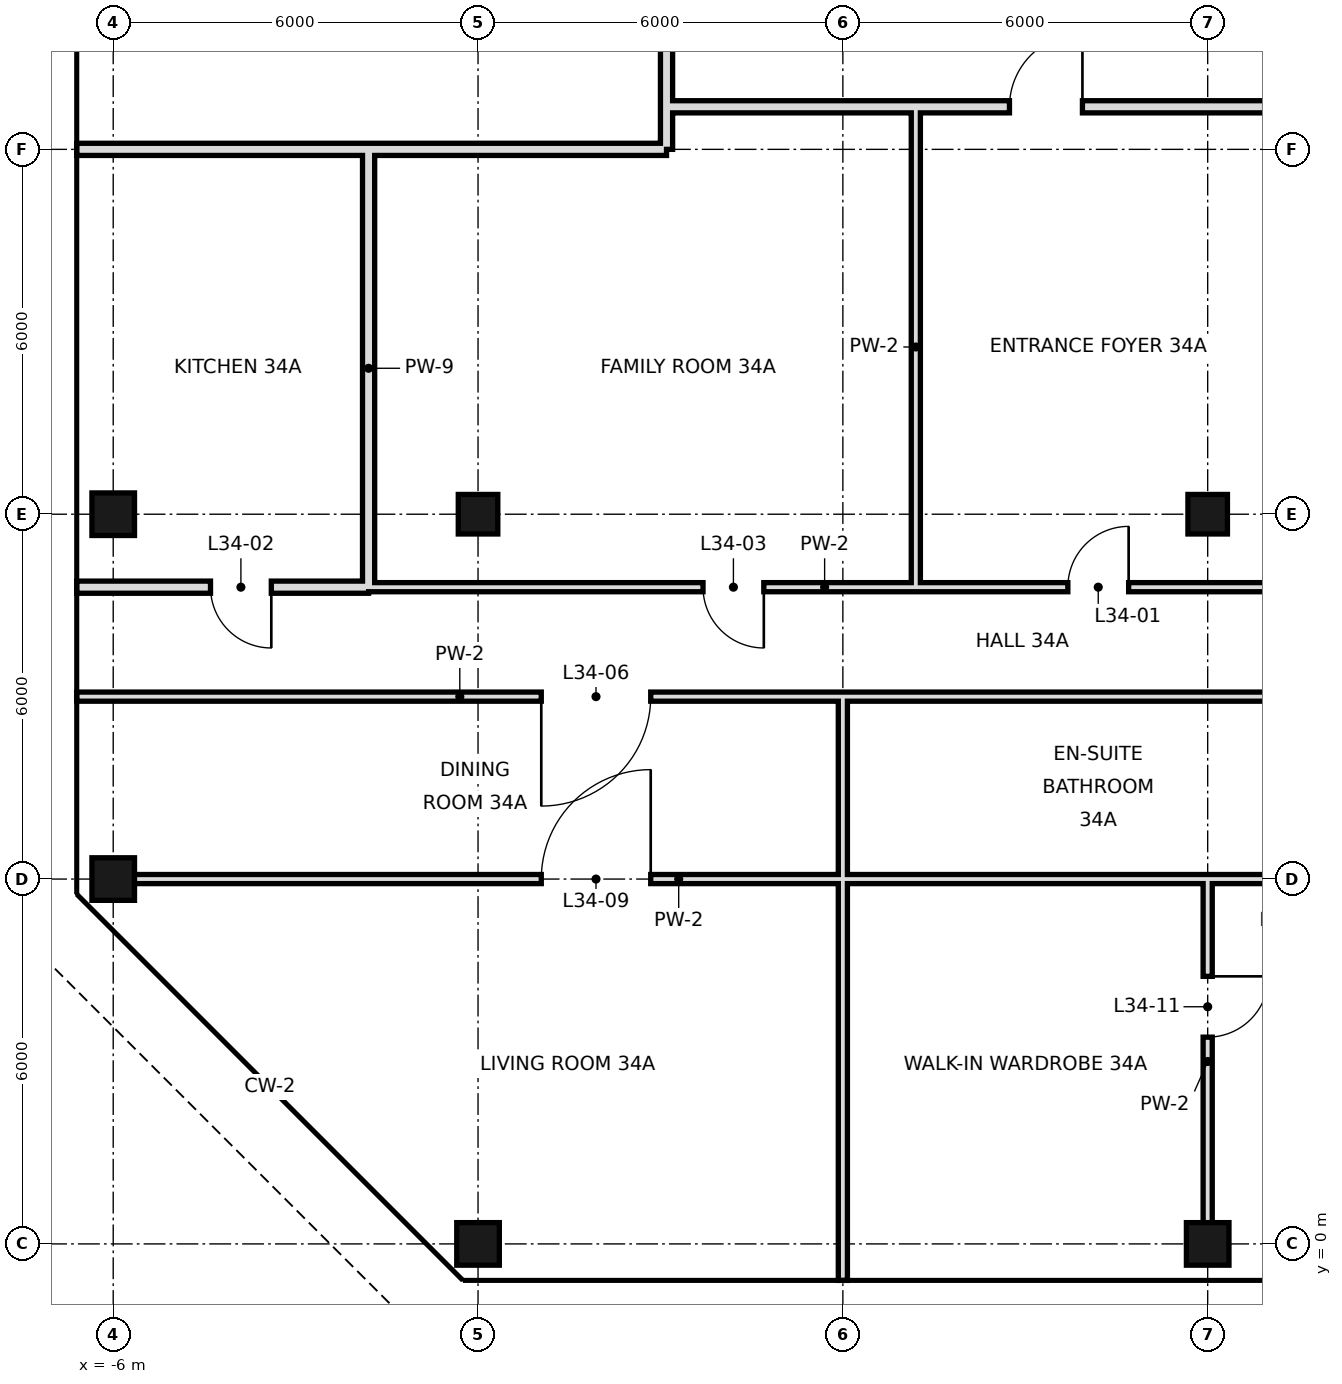
"""IFC4 building model, lengths in metres.
Left out: names, types, materials, properties, quantities, classifications, styles, units other than length and angle.
Written with IfcOpenShell. Run it as: python <this file> out.ifc"""

import sys

from ifc_helpers import new_model, si_unit, direction, frame, frame_2d, origin, origin_2d, place, context, subcontext, project, spatial, rectangle, hollow_rectangle, extrude, element, fill, save


model = new_model("IFC4")
c1 = context("Model", 3, precision=1e-05, world=origin(), true_north=direction((0.0, 1.0)))
c2 = subcontext(c1, "Body", "Model", "MODEL_VIEW")
j1 = project(units=[si_unit("LENGTHUNIT", "METRE"), si_unit("PLANEANGLEUNIT", "RADIAN")], contexts=[c1])
p1 = place(None, origin())
s1 = spatial("IfcSite", under=j1, at=p1, CompositionType="ELEMENT")
p2 = place(p1, origin())
s2 = spatial("IfcBuilding", under=s1, at=p2, CompositionType="ELEMENT")
p3 = place(p2, frame((0.0, 0.0, 151.0)))
s3 = spatial("IfcBuildingStorey", under=s2, at=p3, CompositionType="ELEMENT", Elevation=151.0)
for number, where, z_axis, x_axis in (
    (1, (-6.0, 6.0, 0.0), (0.0, 0.0, 1.0), (1.0, 0.0, 0.0)),
    (2, (-6.0, 12.0, 0.0), (0.0, 0.0, 1.0), (1.0, 0.0, 0.0)),
    (3, (0.0, 0.0, 0.0), (0.0, 0.0, 1.0), (1.0, 0.0, 0.0)),
):
    element("IfcColumn", number, at=place(p3, frame(where, z_axis=z_axis, x_axis=x_axis)), inside=s3, PredefinedType="COLUMN", context=c2, shape_type="SweptSolid", body=[
        extrude(hollow_rectangle(XDim=0.7, YDim=0.7, WallThickness=0.036, at=origin_2d()), origin(), (0.0, 0.0, 1.0), 3.6),
    ])
p4 = place(p3, frame((0.0, 12.0, 0.0), z_axis=(0.0, 0.0, 1.0), x_axis=(1.0, 0.0, 0.0)))
e4 = element("IfcColumn", 4, at=p4, inside=s3, PredefinedType="COLUMN", context=c2, shape_type="SweptSolid", body=[
    extrude(hollow_rectangle(XDim=0.65, YDim=0.65, WallThickness=0.032, at=origin_2d()), origin(), (0.0, 0.0, 1.0), 3.6),
])
p5 = place(p3, frame((12.0, 0.0, 0.0), z_axis=(0.0, 0.0, 1.0), x_axis=(1.0, 0.0, 0.0)))
e5 = element("IfcColumn", 5, at=p5, inside=s3, PredefinedType="COLUMN", context=c2, shape_type="SweptSolid", body=[
    extrude(hollow_rectangle(XDim=0.7, YDim=0.7, WallThickness=0.036, at=origin_2d()), origin(), (0.0, 0.0, 1.0), 3.6),
])
p6 = place(p3, frame((12.0, 12.0, 0.0), z_axis=(0.0, 0.0, 1.0), x_axis=(1.0, 0.0, 0.0)))
e6 = element("IfcColumn", 6, at=p6, inside=s3, PredefinedType="COLUMN", context=c2, shape_type="SweptSolid", body=[
    extrude(hollow_rectangle(XDim=0.65, YDim=0.65, WallThickness=0.032, at=origin_2d()), origin(), (0.0, 0.0, 1.0), 3.6),
])
p7 = place(p3, frame((-1.8, 10.8, 0.0), z_axis=(0.0, 0.0, 1.0), x_axis=(0.0, 1.0, 0.0)))
e7 = element("IfcWall", 7, at=p7, inside=s3, PredefinedType="SOLIDWALL", context=c2, shape_type="SweptSolid", body=[
    extrude(rectangle(XDim=7.2, YDim=0.2, at=frame_2d((3.6, 0.0))), origin(), (0.0, 0.0, 1.0), 3.42),
])
p8 = place(p3, frame((12.0, 0.0, 0.0), z_axis=(0.0, 0.0, 1.0), x_axis=(0.0, 1.0, 0.0)))
e8 = element("IfcWall", 8, at=p8, inside=s3, PredefinedType="PARTITIONING", context=c2, shape_type="SweptSolid", body=[
    extrude(rectangle(XDim=6.0, YDim=0.15, at=frame_2d((3.0, 0.0))), origin(), (0.0, 0.0, 1.0), 2.72),
])
p9 = place(p8, frame((3.4, 0.0, 0.0)))
e9 = element("IfcOpeningElement", 9, at=p9, cuts=e8, PredefinedType="OPENING", context=c2, shape_type="SweptSolid", body=[
    extrude(rectangle(XDim=1.0, YDim=2.4, at=frame_2d((0.5, 1.2))), frame((0.0, 0.085, 0.0), z_axis=(0.0, -1.0, 0.0), x_axis=(1.0, 0.0, 0.0)), (0.0, 0.0, 1.0), 0.17),
])
p10 = place(p3, frame((3.1, 18.0, 0.0), z_axis=(0.0, 0.0, 1.0), x_axis=(0.0, 1.0, 0.0)))
e10 = element("IfcWall", 10, at=p10, inside=s3, PredefinedType="SOLIDWALL", context=c2, shape_type="SweptSolid", body=[
    extrude(rectangle(XDim=30.6, YDim=0.2, at=frame_2d((15.3, 0.0))), origin(), (0.0, 0.0, 1.0), 2.72),
])
p11 = place(p10, frame((20.27, 0.0, 0.0)))
e11 = element("IfcOpeningElement", 11, at=p11, cuts=e10, PredefinedType="OPENING", context=c2, shape_type="SweptSolid", body=[
    extrude(rectangle(XDim=1.2, YDim=2.4, at=frame_2d((0.6, 1.2))), frame((0.0, 0.11, 0.0), z_axis=(0.0, -1.0, 0.0), x_axis=(1.0, 0.0, 0.0)), (0.0, 0.0, 1.0), 0.22),
])
p12 = place(p3, frame((6.0, -0.6, 0.0), z_axis=(0.0, 0.0, 1.0), x_axis=(0.0, 1.0, 0.0)))
e12 = element("IfcWall", 12, at=p12, inside=s3, PredefinedType="PARTITIONING", context=c2, shape_type="SweptSolid", body=[
    extrude(rectangle(XDim=6.6, YDim=0.15, at=frame_2d((3.3, 0.0))), origin(), (0.0, 0.0, 1.0), 2.72),
])
p13 = place(p3, frame((6.0, 6.0, 0.0), z_axis=(0.0, 0.0, 1.0), x_axis=(0.0, 1.0, 0.0)))
e13 = element("IfcWall", 13, at=p13, inside=s3, PredefinedType="PARTITIONING", context=c2, shape_type="SweptSolid", body=[
    extrude(rectangle(XDim=3.0, YDim=0.15, at=frame_2d((1.5, 0.0))), origin(), (0.0, 0.0, 1.0), 2.72),
])
p14 = place(p3, frame((7.2, 10.8, 0.0), z_axis=(0.0, 0.0, 1.0), x_axis=(0.0, 1.0, 0.0)))
e14 = element("IfcWall", 14, at=p14, inside=s3, PredefinedType="PARTITIONING", context=c2, shape_type="SweptSolid", body=[
    extrude(rectangle(XDim=7.9, YDim=0.15, at=frame_2d((3.95, 0.0))), origin(), (0.0, 0.0, 1.0), 3.42),
])
p15 = place(p3, frame((-6.6, 10.8, 0.0), z_axis=(0.0, 0.0, 1.0), x_axis=(1.0, 0.0, 0.0)))
e15 = element("IfcWall", 15, at=p15, inside=s3, PredefinedType="SOLIDWALL", context=c2, shape_type="SweptSolid", body=[
    extrude(rectangle(XDim=4.8, YDim=0.2, at=frame_2d((2.4, 0.0))), origin(), (0.0, 0.0, 1.0), 2.97),
])
p16 = place(p15, frame((2.2, 0.0, 0.0)))
e16 = element("IfcOpeningElement", 16, at=p16, cuts=e15, PredefinedType="OPENING", context=c2, shape_type="SweptSolid", body=[
    extrude(rectangle(XDim=1.0, YDim=2.4, at=frame_2d((0.5, 1.2))), frame((0.0, 0.11, 0.0), z_axis=(0.0, -1.0, 0.0), x_axis=(1.0, 0.0, 0.0)), (0.0, 0.0, 1.0), 0.22),
])
p17 = place(p3, frame((-1.8, 10.8, 0.0), z_axis=(0.0, 0.0, 1.0), x_axis=(1.0, 0.0, 0.0)))
e17 = element("IfcWall", 17, at=p17, inside=s3, PredefinedType="PARTITIONING", context=c2, shape_type="SweptSolid", body=[
    extrude(rectangle(XDim=15.0, YDim=0.15, at=frame_2d((7.5, 0.0))), origin(), (0.0, 0.0, 1.0), 3.42),
])
p18 = place(p17, frame((11.5, 0.0, 0.0)))
e18 = element("IfcOpeningElement", 18, at=p18, cuts=e17, PredefinedType="OPENING", context=c2, shape_type="SweptSolid", body=[
    extrude(rectangle(XDim=1.0, YDim=2.4, at=frame_2d((0.5, 1.2))), frame((0.0, 0.085, 0.0), z_axis=(0.0, -1.0, 0.0), x_axis=(1.0, 0.0, 0.0)), (0.0, 0.0, 1.0), 0.17),
])
p19 = place(p17, frame((5.5, 0.0, 0.0)))
e19 = element("IfcOpeningElement", 19, at=p19, cuts=e17, PredefinedType="OPENING", context=c2, shape_type="SweptSolid", body=[
    extrude(rectangle(XDim=1.0, YDim=2.4, at=frame_2d((0.5, 1.2))), frame((0.0, 0.085, 0.0), z_axis=(0.0, -1.0, 0.0), x_axis=(1.0, 0.0, 0.0)), (0.0, 0.0, 1.0), 0.17),
])
p20 = place(p3, frame((-1.8, 18.0, 0.0), z_axis=(0.0, 0.0, 1.0), x_axis=(1.0, 0.0, 0.0)))
e20 = element("IfcWall", 20, at=p20, inside=s3, PredefinedType="SOLIDWALL", context=c2, shape_type="SweptSolid", body=[
    extrude(rectangle(XDim=4.9, YDim=0.2, at=frame_2d((2.45, 0.0))), origin(), (0.0, 0.0, 1.0), 2.72),
])
p21 = place(p3, frame((-6.6, 18.0, 0.0), z_axis=(0.0, 0.0, 1.0), x_axis=(1.0, 0.0, 0.0)))
e21 = element("IfcWall", 21, at=p21, inside=s3, PredefinedType="SOLIDWALL", context=c2, shape_type="SweptSolid", body=[
    extrude(rectangle(XDim=4.8, YDim=0.2, at=frame_2d((2.4, 0.0))), origin(), (0.0, 0.0, 1.0), 2.72),
])
p22 = place(p3, frame((3.1, 18.7, 0.0), z_axis=(0.0, 0.0, 1.0), x_axis=(1.0, 0.0, 0.0)))
e22 = element("IfcWall", 22, at=p22, inside=s3, PredefinedType="SOLIDWALL", context=c2, shape_type="SweptSolid", body=[
    extrude(rectangle(XDim=41.8, YDim=0.2, at=frame_2d((20.9, 0.0))), origin(), (0.0, 0.0, 1.0), 2.72),
])
p23 = place(p22, frame((5.64, 0.0, 0.0)))
e23 = element("IfcOpeningElement", 23, at=p23, cuts=e22, PredefinedType="OPENING", context=c2, shape_type="SweptSolid", body=[
    extrude(rectangle(XDim=1.2, YDim=2.4, at=frame_2d((0.6, 1.2))), frame((0.0, 0.11, 0.0), z_axis=(0.0, -1.0, 0.0), x_axis=(1.0, 0.0, 0.0)), (0.0, 0.0, 1.0), 0.22),
])
p24 = place(p22, frame((24.16, 0.0, 0.0)))
e24 = element("IfcOpeningElement", 24, at=p24, cuts=e22, PredefinedType="OPENING", context=c2, shape_type="SweptSolid", body=[
    extrude(rectangle(XDim=1.2, YDim=2.4, at=frame_2d((0.6, 1.2))), frame((0.0, 0.11, 0.0), z_axis=(0.0, -1.0, 0.0), x_axis=(1.0, 0.0, 0.0)), (0.0, 0.0, 1.0), 0.22),
])
p25 = place(p3, frame((-6.0, 6.0, 0.0), z_axis=(0.0, 0.0, 1.0), x_axis=(1.0, 0.0, 0.0)))
e25 = element("IfcWall", 25, at=p25, inside=s3, PredefinedType="PARTITIONING", context=c2, shape_type="SweptSolid", body=[
    extrude(rectangle(XDim=12.0, YDim=0.15, at=frame_2d((6.0, 0.0))), origin(), (0.0, 0.0, 1.0), 2.97),
])
p26 = place(p25, frame((7.04, 0.0, 0.0)))
e26 = element("IfcOpeningElement", 26, at=p26, cuts=e25, PredefinedType="OPENING", context=c2, shape_type="SweptSolid", body=[
    extrude(rectangle(XDim=1.8, YDim=2.4, at=frame_2d((0.9, 1.2))), frame((0.0, 0.085, 0.0), z_axis=(0.0, -1.0, 0.0), x_axis=(1.0, 0.0, 0.0)), (0.0, 0.0, 1.0), 0.17),
])
p27 = place(p3, frame((6.0, 6.0, 0.0), z_axis=(0.0, 0.0, 1.0), x_axis=(1.0, 0.0, 0.0)))
e27 = element("IfcWall", 27, at=p27, inside=s3, PredefinedType="PARTITIONING", context=c2, shape_type="SweptSolid", body=[
    extrude(rectangle(XDim=8.4, YDim=0.15, at=frame_2d((4.2, 0.0))), origin(), (0.0, 0.0, 1.0), 2.97),
])
p28 = place(p27, frame((6.95, 0.0, 0.0)))
e28 = element("IfcOpeningElement", 28, at=p28, cuts=e27, PredefinedType="OPENING", context=c2, shape_type="SweptSolid", body=[
    extrude(rectangle(XDim=0.9, YDim=2.4, at=frame_2d((0.45, 1.2))), frame((0.0, 0.085, 0.0), z_axis=(0.0, -1.0, 0.0), x_axis=(1.0, 0.0, 0.0)), (0.0, 0.0, 1.0), 0.17),
])
p29 = place(p3, frame((-6.6, 9.0, 0.0), z_axis=(0.0, 0.0, 1.0), x_axis=(1.0, 0.0, 0.0)))
e29 = element("IfcWall", 29, at=p29, inside=s3, PredefinedType="PARTITIONING", context=c2, shape_type="SweptSolid", body=[
    extrude(rectangle(XDim=12.6, YDim=0.15, at=frame_2d((6.3, 0.0))), origin(), (0.0, 0.0, 1.0), 3.42),
])
p30 = place(p29, frame((7.64, 0.0, 0.0)))
e30 = element("IfcOpeningElement", 30, at=p30, cuts=e29, PredefinedType="OPENING", context=c2, shape_type="SweptSolid", body=[
    extrude(rectangle(XDim=1.8, YDim=2.4, at=frame_2d((0.9, 1.2))), frame((0.0, 0.085, 0.0), z_axis=(0.0, -1.0, 0.0), x_axis=(1.0, 0.0, 0.0)), (0.0, 0.0, 1.0), 0.17),
])
p31 = place(p3, frame((6.0, 9.0, 0.0), z_axis=(0.0, 0.0, 1.0), x_axis=(1.0, 0.0, 0.0)))
e31 = element("IfcWall", 31, at=p31, inside=s3, PredefinedType="PARTITIONING", context=c2, shape_type="SweptSolid", body=[
    extrude(rectangle(XDim=8.4, YDim=0.15, at=frame_2d((4.2, 0.0))), origin(), (0.0, 0.0, 1.0), 3.42),
])
p32 = place(p18, frame((1.0, 0.0, 0.0), z_axis=(0.0, 0.0, 1.0), x_axis=(-1.0, 0.0, 0.0)))
e32 = element("IfcDoor", 32, at=p32, inside=s3, OperationType="SINGLE_SWING_LEFT", PredefinedType="DOOR", context=c2, shape_type="SweptSolid", body=[
    extrude(rectangle(XDim=1.0, YDim=2.4, at=frame_2d((0.5, 1.2))), frame((0.0, 0.025, 0.0), z_axis=(0.0, -1.0, 0.0), x_axis=(1.0, 0.0, 0.0)), (0.0, 0.0, 1.0), 0.05),
])
fill(e18, e32)
p33 = place(p16, origin())
e33 = element("IfcDoor", 33, at=p33, inside=s3, OperationType="SINGLE_SWING_RIGHT", PredefinedType="DOOR", context=c2, shape_type="SweptSolid", body=[
    extrude(rectangle(XDim=1.0, YDim=2.4, at=frame_2d((0.5, 1.2))), frame((0.0, 0.025, 0.0), z_axis=(0.0, -1.0, 0.0), x_axis=(1.0, 0.0, 0.0)), (0.0, 0.0, 1.0), 0.05),
])
fill(e16, e33)
p34 = place(p19, origin())
e34 = element("IfcDoor", 34, at=p34, inside=s3, OperationType="SINGLE_SWING_RIGHT", PredefinedType="DOOR", context=c2, shape_type="SweptSolid", body=[
    extrude(rectangle(XDim=1.0, YDim=2.4, at=frame_2d((0.5, 1.2))), frame((0.0, 0.025, 0.0), z_axis=(0.0, -1.0, 0.0), x_axis=(1.0, 0.0, 0.0)), (0.0, 0.0, 1.0), 0.05),
])
fill(e19, e34)
p35 = place(p30, frame((1.8, 0.0, 0.0), z_axis=(0.0, 0.0, 1.0), x_axis=(-1.0, 0.0, 0.0)))
e35 = element("IfcDoor", 35, at=p35, inside=s3, OperationType="SINGLE_SWING_RIGHT", PredefinedType="DOOR", context=c2, shape_type="SweptSolid", body=[
    extrude(rectangle(XDim=1.8, YDim=2.4, at=frame_2d((0.9, 1.2))), frame((0.0, 0.025, 0.0), z_axis=(0.0, -1.0, 0.0), x_axis=(1.0, 0.0, 0.0)), (0.0, 0.0, 1.0), 0.05),
])
fill(e30, e35)
p36 = place(p26, frame((1.8, 0.0, 0.0), z_axis=(0.0, 0.0, 1.0), x_axis=(-1.0, 0.0, 0.0)))
e36 = element("IfcDoor", 36, at=p36, inside=s3, OperationType="SINGLE_SWING_LEFT", PredefinedType="DOOR", context=c2, shape_type="SweptSolid", body=[
    extrude(rectangle(XDim=1.8, YDim=2.4, at=frame_2d((0.9, 1.2))), frame((0.0, 0.025, 0.0), z_axis=(0.0, -1.0, 0.0), x_axis=(1.0, 0.0, 0.0)), (0.0, 0.0, 1.0), 0.05),
])
fill(e26, e36)
p37 = place(p9, origin())
e37 = element("IfcDoor", 37, at=p37, inside=s3, OperationType="SINGLE_SWING_RIGHT", PredefinedType="DOOR", context=c2, shape_type="SweptSolid", body=[
    extrude(rectangle(XDim=1.0, YDim=2.4, at=frame_2d((0.5, 1.2))), frame((0.0, 0.025, 0.0), z_axis=(0.0, -1.0, 0.0), x_axis=(1.0, 0.0, 0.0)), (0.0, 0.0, 1.0), 0.05),
])
fill(e9, e37)
p38 = place(p23, frame((1.2, 0.0, 0.0), z_axis=(0.0, 0.0, 1.0), x_axis=(-1.0, 0.0, 0.0)))
e38 = element("IfcDoor", 38, at=p38, inside=s3, OperationType="SINGLE_SWING_LEFT", PredefinedType="DOOR", context=c2, shape_type="SweptSolid", body=[
    extrude(rectangle(XDim=1.2, YDim=2.4, at=frame_2d((0.6, 1.2))), frame((0.0, 0.025, 0.0), z_axis=(0.0, -1.0, 0.0), x_axis=(1.0, 0.0, 0.0)), (0.0, 0.0, 1.0), 0.05),
])
fill(e23, e38)
save(model, sys.argv[1])
